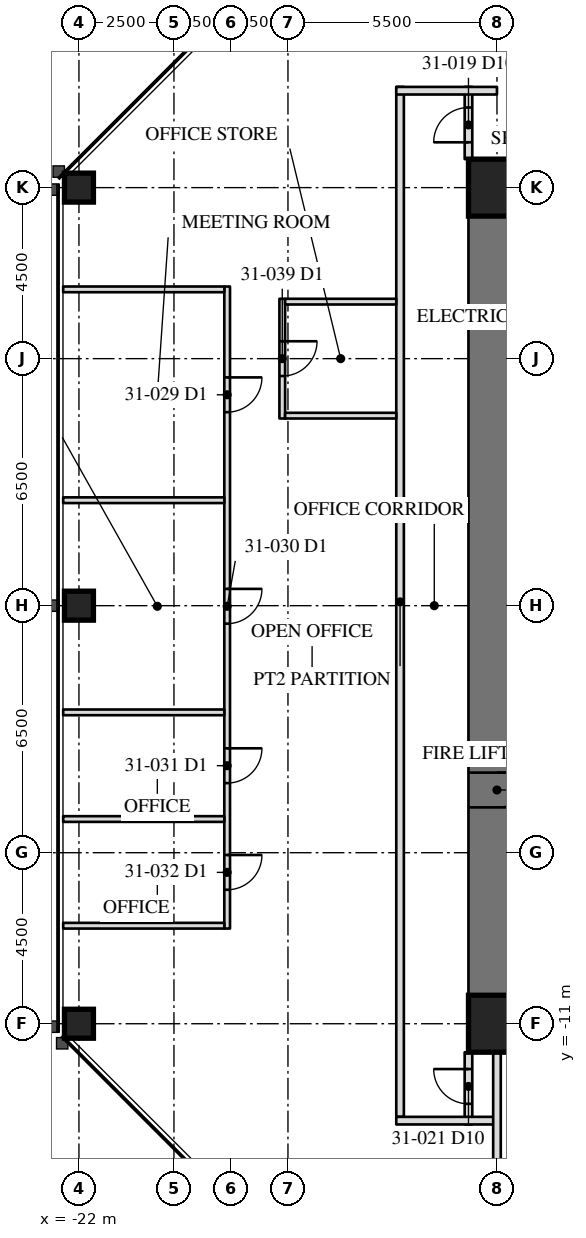
"""IFC4 building model, lengths in metres.
Left out: names, types, materials, properties, quantities, classifications, styles, units other than length and angle.
Written with IfcOpenShell. Run it as: python <this file> out.ifc"""

import sys

from ifc_helpers import new_model, si_unit, direction, frame, frame_2d, origin, origin_2d, place, context, subcontext, project, spatial, rectangle, hollow_rectangle, extrude, element, fill, save


model = new_model("IFC4")
c1 = context("Model", 3, precision=1e-05, world=origin(), true_north=direction((0.0, 1.0)))
c2 = subcontext(c1, "Body", "Model", "MODEL_VIEW")
j1 = project(units=[si_unit("LENGTHUNIT", "METRE"), si_unit("PLANEANGLEUNIT", "RADIAN")], contexts=[c1])
p1 = place(None, origin())
s1 = spatial("IfcSite", under=j1, at=p1, CompositionType="ELEMENT")
p2 = place(p1, origin())
s2 = spatial("IfcBuilding", under=s1, at=p2, CompositionType="ELEMENT")
p3 = place(p2, frame((0.0, 0.0, 133.6)))
s3 = spatial("IfcBuildingStorey", under=s2, at=p3, CompositionType="ELEMENT", Elevation=133.6)
for number, where, z_axis, x_axis in (
    (1, (-22.0, 0.0, 0.0), (0.0, 0.0, 1.0), (0.0, 1.0, 0.0)),
    (2, (-22.0, -11.0, 0.0), (0.0, 0.0, 1.0), (0.0, 1.0, 0.0)),
    (3, (-22.0, 11.0, 0.0), (0.0, 0.0, 1.0), (0.0, 1.0, 0.0)),
):
    element("IfcColumn", number, at=place(p3, frame(where, z_axis=z_axis, x_axis=x_axis)), inside=s3, PredefinedType="COLUMN", context=c2, shape_type="SweptSolid", body=[
        extrude(hollow_rectangle(XDim=0.762, YDim=0.762, WallThickness=0.076, at=origin_2d()), origin(), (0.0, 0.0, 1.0), 4.1),
    ])
p4 = place(p3, frame((-11.0, 11.0, 0.0), z_axis=(0.0, 0.0, 1.0), x_axis=(0.0, -1.0, 0.0)))
e4 = element("IfcWall", 4, at=p4, inside=s3, PredefinedType="SHEAR", context=c2, shape_type="SweptSolid", body=[
    extrude(rectangle(XDim=22.0, YDim=1.5, at=frame_2d((11.0, 0.0))), origin(), (0.0, 0.0, 1.0), 4.1),
])
p5 = place(p4, frame((15.393, 0.0, 0.0)))
e5 = element("IfcOpeningElement", 5, at=p5, cuts=e4, PredefinedType="OPENING", context=c2, shape_type="SweptSolid", body=[
    extrude(rectangle(XDim=0.915, YDim=2.134, at=frame_2d((0.458, 1.067))), frame((0.0, 0.76, 0.0), z_axis=(0.0, -1.0, 0.0), x_axis=(1.0, 0.0, 0.0)), (0.0, 0.0, 1.0), 1.52),
])
for number, where, z_axis, x_axis in (
    (6, (-6.5, 11.0, 0.0), (0.0, 0.0, 1.0), (-1.0, 0.0, 0.0)),
    (7, (-11.0, -11.0, 0.0), (0.0, 0.0, 1.0), (1.0, 0.0, 0.0)),
):
    element("IfcWall", number, at=place(p3, frame(where, z_axis=z_axis, x_axis=x_axis)), inside=s3, PredefinedType="SHEAR", context=c2, shape_type="SweptSolid", body=[
        extrude(rectangle(XDim=4.5, YDim=1.5, at=frame_2d((2.25, 0.0))), origin(), (0.0, 0.0, 1.0), 4.1),
    ])
for number, where, z_axis, x_axis in (
    (8, (-11.0, 11.0, 0.0), (0.0, 0.0, 1.0), (1.0, 0.0, 0.0)),
    (9, (-11.0, -11.0, 0.0), (0.0, 0.0, 1.0), (1.0, 0.0, 0.0)),
):
    element("IfcColumn", number, at=place(p3, frame(where, z_axis=z_axis, x_axis=x_axis)), inside=s3, PredefinedType="COLUMN", context=c2, shape_type="SweptSolid", body=[
        extrude(hollow_rectangle(XDim=1.499, YDim=1.499, WallThickness=0.102, at=origin_2d()), origin(), (0.0, 0.0, 1.0), 4.1),
    ])
p6 = place(p3, frame((-13.55, 13.65, 0.0), z_axis=(0.0, 0.0, 1.0), x_axis=(0.0, -1.0, 0.0)))
e10 = element("IfcWall", 10, at=p6, inside=s3, PredefinedType="PARTITIONING", context=c2, shape_type="SweptSolid", body=[
    extrude(rectangle(XDim=27.1, YDim=0.2, at=frame_2d((13.55, 0.0))), origin(), (0.0, 0.0, 1.0), 3.91),
])
p7 = place(p3, frame((-11.75, 11.75, 0.0), z_axis=(0.0, 0.0, 1.0), x_axis=(0.0, 1.0, 0.0)))
e11 = element("IfcWall", 11, at=p7, inside=s3, PredefinedType="PARTITIONING", context=c2, shape_type="SweptSolid", body=[
    extrude(rectangle(XDim=1.9, YDim=0.2, at=frame_2d((0.95, 0.0))), origin(), (0.0, 0.0, 1.0), 3.91),
])
p8 = place(p7, frame((0.442, 0.0, 0.0)))
e12 = element("IfcOpeningElement", 12, at=p8, cuts=e11, PredefinedType="OPENING", context=c2, shape_type="SweptSolid", body=[
    extrude(rectangle(XDim=0.915, YDim=2.134, at=frame_2d((0.458, 1.067))), frame((0.0, 0.11, 0.0), z_axis=(0.0, -1.0, 0.0), x_axis=(1.0, 0.0, 0.0)), (0.0, 0.0, 1.0), 0.22),
])
p9 = place(p3, frame((-11.0, 13.55, 0.0), z_axis=(0.0, 0.0, 1.0), x_axis=(-1.0, 0.0, 0.0)))
e13 = element("IfcWall", 13, at=p9, inside=s3, PredefinedType="PARTITIONING", context=c2, shape_type="SweptSolid", body=[
    extrude(rectangle(XDim=2.65, YDim=0.2, at=frame_2d((1.325, 0.0))), origin(), (0.0, 0.0, 1.0), 3.91),
])
p10 = place(p3, frame((-11.75, -11.75, 0.0), z_axis=(0.0, 0.0, 1.0), x_axis=(0.0, -1.0, 0.0)))
e14 = element("IfcWall", 14, at=p10, inside=s3, PredefinedType="PARTITIONING", context=c2, shape_type="SweptSolid", body=[
    extrude(rectangle(XDim=1.9, YDim=0.2, at=frame_2d((0.95, 0.0))), origin(), (0.0, 0.0, 1.0), 3.91),
])
p11 = place(p10, frame((0.442, 0.0, 0.0)))
e15 = element("IfcOpeningElement", 15, at=p11, cuts=e14, PredefinedType="OPENING", context=c2, shape_type="SweptSolid", body=[
    extrude(rectangle(XDim=0.915, YDim=2.134, at=frame_2d((0.458, 1.067))), frame((0.0, 0.11, 0.0), z_axis=(0.0, -1.0, 0.0), x_axis=(1.0, 0.0, 0.0)), (0.0, 0.0, 1.0), 0.22),
])
p12 = place(p3, frame((-11.0, -13.55, 0.0), z_axis=(0.0, 0.0, 1.0), x_axis=(-1.0, 0.0, 0.0)))
e16 = element("IfcWall", 16, at=p12, inside=s3, PredefinedType="PARTITIONING", context=c2, shape_type="SweptSolid", body=[
    extrude(rectangle(XDim=2.65, YDim=0.2, at=frame_2d((1.325, 0.0))), origin(), (0.0, 0.0, 1.0), 3.91),
])
p13 = place(p3, frame((-11.0, -11.75, 0.0), z_axis=(0.0, 0.0, 1.0), x_axis=(0.0, -1.0, 0.0)))
e17 = element("IfcWall", 17, at=p13, inside=s3, PredefinedType="PARTITIONING", context=c2, shape_type="SweptSolid", body=[
    extrude(rectangle(XDim=10.665, YDim=0.2, at=frame_2d((5.333, 0.0))), origin(), (0.0, 0.0, 1.0), 3.326),
])
p14 = place(p3, frame((-18.1, 8.398, 0.0), z_axis=(0.0, 0.0, 1.0), x_axis=(0.0, -1.0, 0.0)))
e18 = element("IfcWall", 18, at=p14, inside=s3, PredefinedType="PARTITIONING", context=c2, shape_type="SweptSolid", body=[
    extrude(rectangle(XDim=16.894, YDim=0.15, at=frame_2d((8.447, 0.0))), origin(), (0.0, 0.0, 1.0), 3.91),
])
p15 = place(p14, frame((2.392, 0.0, 0.0)))
e19 = element("IfcOpeningElement", 19, at=p15, cuts=e18, PredefinedType="OPENING", context=c2, shape_type="SweptSolid", body=[
    extrude(rectangle(XDim=0.915, YDim=2.134, at=frame_2d((0.458, 1.067))), frame((0.0, 0.085, 0.0), z_axis=(0.0, -1.0, 0.0), x_axis=(1.0, 0.0, 0.0)), (0.0, 0.0, 1.0), 0.17),
])
p16 = place(p14, frame((7.957, 0.0, 0.0)))
e20 = element("IfcOpeningElement", 20, at=p16, cuts=e18, PredefinedType="OPENING", context=c2, shape_type="SweptSolid", body=[
    extrude(rectangle(XDim=0.915, YDim=2.134, at=frame_2d((0.458, 1.067))), frame((0.0, 0.085, 0.0), z_axis=(0.0, -1.0, 0.0), x_axis=(1.0, 0.0, 0.0)), (0.0, 0.0, 1.0), 0.17),
])
p17 = place(p14, frame((12.151, 0.0, 0.0)))
e21 = element("IfcOpeningElement", 21, at=p17, cuts=e18, PredefinedType="OPENING", context=c2, shape_type="SweptSolid", body=[
    extrude(rectangle(XDim=0.915, YDim=2.134, at=frame_2d((0.458, 1.067))), frame((0.0, 0.085, 0.0), z_axis=(0.0, -1.0, 0.0), x_axis=(1.0, 0.0, 0.0)), (0.0, 0.0, 1.0), 0.17),
])
p18 = place(p14, frame((14.958, 0.0, 0.0)))
e22 = element("IfcOpeningElement", 22, at=p18, cuts=e18, PredefinedType="OPENING", context=c2, shape_type="SweptSolid", body=[
    extrude(rectangle(XDim=0.915, YDim=2.134, at=frame_2d((0.458, 1.067))), frame((0.0, 0.085, 0.0), z_axis=(0.0, -1.0, 0.0), x_axis=(1.0, 0.0, 0.0)), (0.0, 0.0, 1.0), 0.17),
])
for number, where, z_axis, x_axis in (
    (23, (-18.175, 8.323, 0.0), (0.0, 0.0, 1.0), (-1.0, 0.0, 0.0)),
    (24, (-18.175, 2.775, 0.0), (0.0, 0.0, 1.0), (-1.0, 0.0, 0.0)),
    (25, (-18.175, -2.807, 0.0), (0.0, 0.0, 1.0), (-1.0, 0.0, 0.0)),
    (26, (-18.175, -5.614, 0.0), (0.0, 0.0, 1.0), (-1.0, 0.0, 0.0)),
    (27, (-18.175, -8.421, 0.0), (0.0, 0.0, 1.0), (-1.0, 0.0, 0.0)),
):
    element("IfcWall", number, at=place(p3, frame(where, z_axis=z_axis, x_axis=x_axis)), inside=s3, PredefinedType="PARTITIONING", context=c2, shape_type="SweptSolid", body=[
        extrude(rectangle(XDim=4.24, YDim=0.15, at=frame_2d((2.12, 0.0))), origin(), (0.0, 0.0, 1.0), 3.91),
    ])
p19 = place(p3, frame((-16.65, 8.075, 0.0), z_axis=(0.0, 0.0, 1.0), x_axis=(0.0, -1.0, 0.0)))
e28 = element("IfcWall", 28, at=p19, inside=s3, PredefinedType="PARTITIONING", context=c2, shape_type="SweptSolid", body=[
    extrude(rectangle(XDim=3.15, YDim=0.15, at=frame_2d((1.575, 0.0))), origin(), (0.0, 0.0, 1.0), 3.91),
])
p20 = place(p19, frame((1.117, 0.0, 0.0)))
e29 = element("IfcOpeningElement", 29, at=p20, cuts=e28, PredefinedType="OPENING", context=c2, shape_type="SweptSolid", body=[
    extrude(rectangle(XDim=0.915, YDim=2.134, at=frame_2d((0.458, 1.067))), frame((0.0, 0.085, 0.0), z_axis=(0.0, -1.0, 0.0), x_axis=(1.0, 0.0, 0.0)), (0.0, 0.0, 1.0), 0.17),
])
for number, where, z_axis, x_axis in (
    (30, (-16.575, 8.0, 0.0), (0.0, 0.0, 1.0), (1.0, 0.0, 0.0)),
    (31, (-16.575, 5.0, 0.0), (0.0, 0.0, 1.0), (1.0, 0.0, 0.0)),
):
    element("IfcWall", number, at=place(p3, frame(where, z_axis=z_axis, x_axis=x_axis)), inside=s3, PredefinedType="PARTITIONING", context=c2, shape_type="SweptSolid", body=[
        extrude(rectangle(XDim=2.925, YDim=0.15, at=frame_2d((1.462, 0.0))), origin(), (0.0, 0.0, 1.0), 3.91),
    ])
p21 = place(p5, origin())
e32 = element("IfcDoor", 32, at=p21, inside=s3, OperationType="SINGLE_SWING_RIGHT", PredefinedType="DOOR", context=c2, shape_type="SweptSolid", body=[
    extrude(rectangle(XDim=0.915, YDim=2.134, at=frame_2d((0.458, 1.067))), frame((0.0, -0.675, 0.0), z_axis=(0.0, -1.0, 0.0), x_axis=(1.0, 0.0, 0.0)), (0.0, 0.0, 1.0), 0.05),
])
fill(e5, e32)
p22 = place(p8, origin())
e33 = element("IfcDoor", 33, at=p22, inside=s3, OperationType="SINGLE_SWING_LEFT", PredefinedType="DOOR", context=c2, shape_type="SweptSolid", body=[
    extrude(rectangle(XDim=0.915, YDim=2.134, at=frame_2d((0.458, 1.067))), frame((0.0, 0.025, 0.0), z_axis=(0.0, -1.0, 0.0), x_axis=(1.0, 0.0, 0.0)), (0.0, 0.0, 1.0), 0.05),
])
fill(e12, e33)
p23 = place(p11, frame((0.915, 0.0, 0.0), z_axis=(0.0, 0.0, 1.0), x_axis=(-1.0, 0.0, 0.0)))
e34 = element("IfcDoor", 34, at=p23, inside=s3, OperationType="SINGLE_SWING_LEFT", PredefinedType="DOOR", context=c2, shape_type="SweptSolid", body=[
    extrude(rectangle(XDim=0.915, YDim=2.134, at=frame_2d((0.458, 1.067))), frame((0.0, 0.025, 0.0), z_axis=(0.0, -1.0, 0.0), x_axis=(1.0, 0.0, 0.0)), (0.0, 0.0, 1.0), 0.05),
])
fill(e15, e34)
p24 = place(p15, origin())
e35 = element("IfcDoor", 35, at=p24, inside=s3, OperationType="SINGLE_SWING_LEFT", PredefinedType="DOOR", context=c2, shape_type="SweptSolid", body=[
    extrude(rectangle(XDim=0.915, YDim=2.134, at=frame_2d((0.458, 1.067))), frame((0.0, 0.025, 0.0), z_axis=(0.0, -1.0, 0.0), x_axis=(1.0, 0.0, 0.0)), (0.0, 0.0, 1.0), 0.05),
])
fill(e19, e35)
p25 = place(p16, origin())
e36 = element("IfcDoor", 36, at=p25, inside=s3, OperationType="SINGLE_SWING_LEFT", PredefinedType="DOOR", context=c2, shape_type="SweptSolid", body=[
    extrude(rectangle(XDim=0.915, YDim=2.134, at=frame_2d((0.458, 1.067))), frame((0.0, 0.025, 0.0), z_axis=(0.0, -1.0, 0.0), x_axis=(1.0, 0.0, 0.0)), (0.0, 0.0, 1.0), 0.05),
])
fill(e20, e36)
p26 = place(p17, origin())
e37 = element("IfcDoor", 37, at=p26, inside=s3, OperationType="SINGLE_SWING_LEFT", PredefinedType="DOOR", context=c2, shape_type="SweptSolid", body=[
    extrude(rectangle(XDim=0.915, YDim=2.134, at=frame_2d((0.458, 1.067))), frame((0.0, 0.025, 0.0), z_axis=(0.0, -1.0, 0.0), x_axis=(1.0, 0.0, 0.0)), (0.0, 0.0, 1.0), 0.05),
])
fill(e21, e37)
p27 = place(p18, origin())
e38 = element("IfcDoor", 38, at=p27, inside=s3, OperationType="SINGLE_SWING_LEFT", PredefinedType="DOOR", context=c2, shape_type="SweptSolid", body=[
    extrude(rectangle(XDim=0.915, YDim=2.134, at=frame_2d((0.458, 1.067))), frame((0.0, 0.025, 0.0), z_axis=(0.0, -1.0, 0.0), x_axis=(1.0, 0.0, 0.0)), (0.0, 0.0, 1.0), 0.05),
])
fill(e22, e38)
p28 = place(p20, origin())
e39 = element("IfcDoor", 39, at=p28, inside=s3, OperationType="SINGLE_SWING_LEFT", PredefinedType="DOOR", context=c2, shape_type="SweptSolid", body=[
    extrude(rectangle(XDim=0.915, YDim=2.134, at=frame_2d((0.458, 1.067))), frame((0.0, 0.025, 0.0), z_axis=(0.0, -1.0, 0.0), x_axis=(1.0, 0.0, 0.0)), (0.0, 0.0, 1.0), 0.05),
])
fill(e29, e39)
save(model, sys.argv[1])
